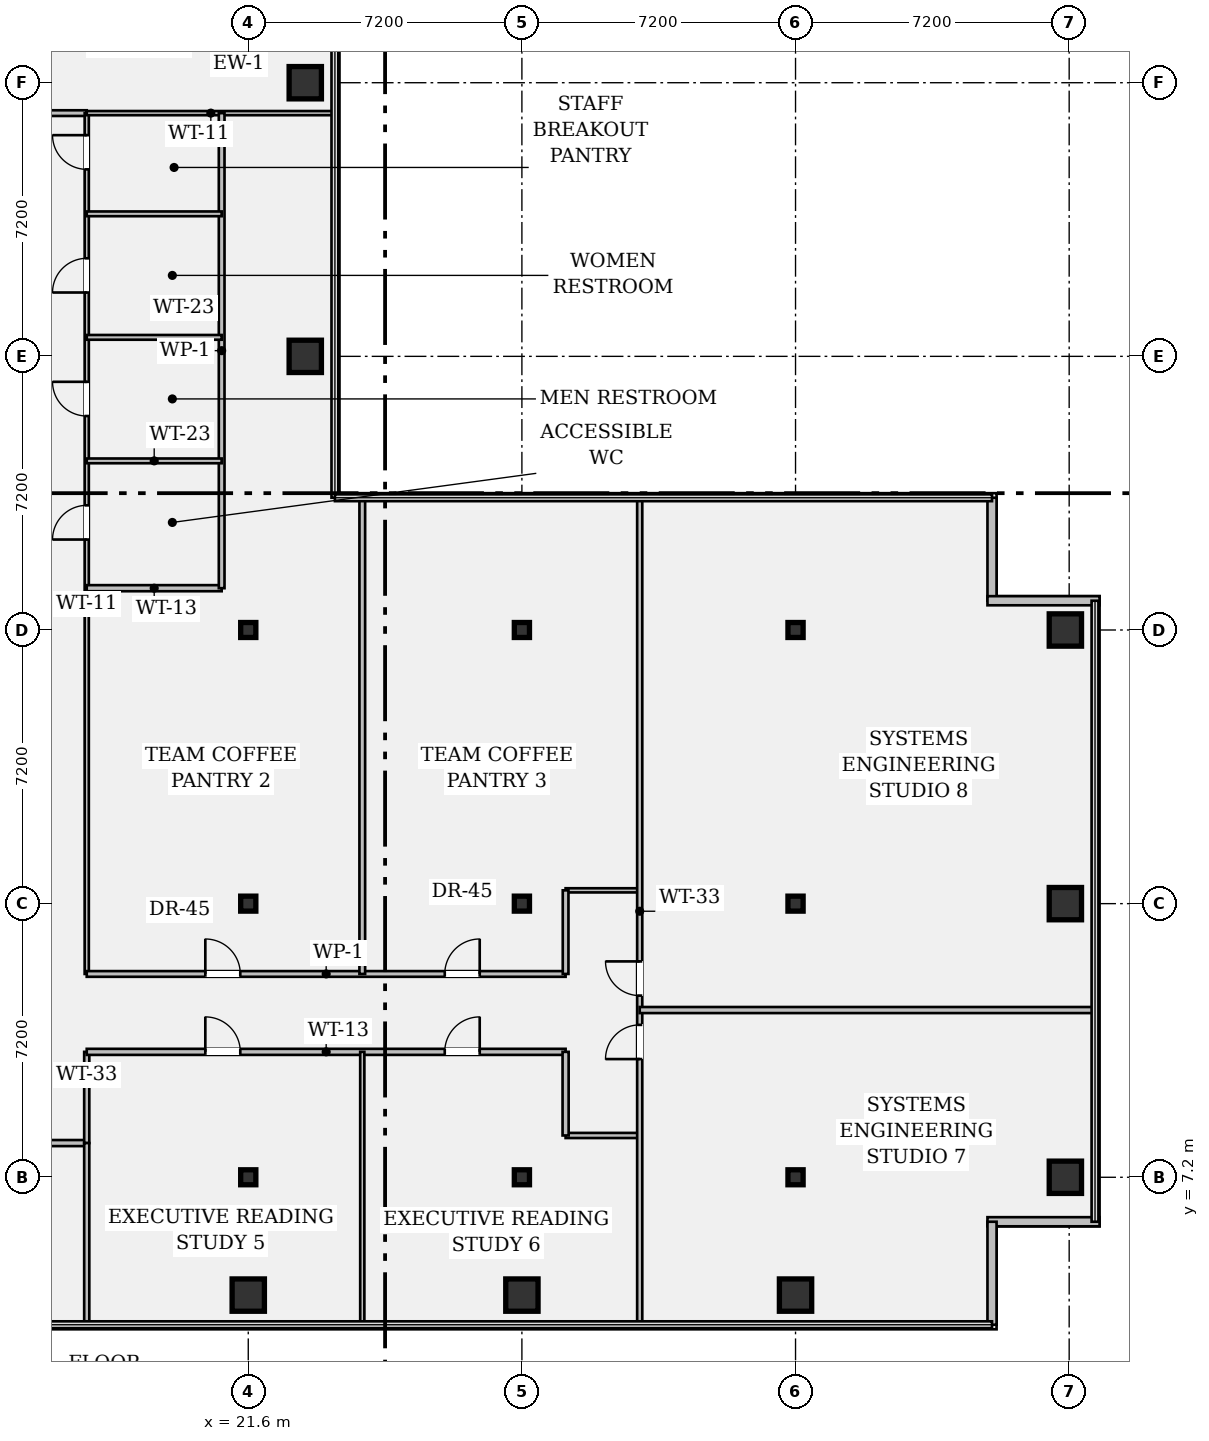
"""IFC4 building model, lengths in metres.
Left out: names, types, materials, properties, quantities, classifications, styles, units other than length and angle.
Written with IfcOpenShell. Run it as: python <this file> out.ifc"""

import sys

from ifc_helpers import new_model, si_unit, direction, frame, frame_2d, origin, origin_2d, place, context, subcontext, project, spatial, rectangle, hollow_rectangle, i_section, extrude, element, fill, save


model = new_model("IFC4")
c1 = context("Model", 3, precision=1e-05, world=origin(), true_north=direction((0.0, 1.0)))
c2 = subcontext(c1, "Body", "Model", "MODEL_VIEW")
j1 = project(units=[si_unit("LENGTHUNIT", "METRE"), si_unit("PLANEANGLEUNIT", "RADIAN")], contexts=[c1])
p1 = place(None, origin())
s1 = spatial("IfcSite", under=j1, at=p1, CompositionType="ELEMENT")
p2 = place(p1, origin())
s2 = spatial("IfcBuilding", under=s1, at=p2, CompositionType="ELEMENT")
p3 = place(p2, frame((0.0, 0.0, 173.25)))
s3 = spatial("IfcBuildingStorey", under=s2, at=p3, CompositionType="ELEMENT", Elevation=173.25)
p4 = place(p3, frame((21.6, 4.1, 0.0), z_axis=(0.0, 0.0, 1.0), x_axis=(1.0, 0.0, 0.0)))
e1 = element("IfcColumn", 1, at=p4, inside=s3, PredefinedType="COLUMN", context=c2, shape_type="SweptSolid", body=[
    extrude(hollow_rectangle(XDim=0.85, YDim=0.85, WallThickness=0.05, at=origin_2d()), origin(), (0.0, 0.0, 1.0), 3.24),
])
for number, where, z_axis, x_axis in (
    (2, (21.6, 7.2, 0.0), (0.0, 0.0, 1.0), (1.0, 0.0, 0.0)),
    (3, (21.6, 14.4, 0.0), (0.0, 0.0, 1.0), (1.0, 0.0, 0.0)),
    (4, (21.6, 21.6, 0.0), (0.0, 0.0, 1.0), (1.0, 0.0, 0.0)),
):
    element("IfcColumn", number, at=place(p3, frame(where, z_axis=z_axis, x_axis=x_axis)), inside=s3, PredefinedType="COLUMN", context=c2, shape_type="SweptSolid", body=[
        extrude(i_section(OverallWidth=0.399, OverallDepth=0.394, WebThickness=0.023, FlangeThickness=0.037, FilletRadius=0.018, at=origin_2d()), origin(), (0.0, 0.0, 1.0), 3.24),
    ])
for number, where, z_axis, x_axis in (
    (5, (23.1, 28.8, 0.0), (0.0, 0.0, 1.0), (1.0, 0.0, 0.0)),
    (6, (23.1, 36.0, 0.0), (0.0, 0.0, 1.0), (1.0, 0.0, 0.0)),
    (7, (28.8, 4.1, 0.0), (0.0, 0.0, 1.0), (1.0, 0.0, 0.0)),
):
    element("IfcColumn", number, at=place(p3, frame(where, z_axis=z_axis, x_axis=x_axis)), inside=s3, PredefinedType="COLUMN", context=c2, shape_type="SweptSolid", body=[
        extrude(hollow_rectangle(XDim=0.85, YDim=0.85, WallThickness=0.05, at=origin_2d()), origin(), (0.0, 0.0, 1.0), 3.24),
    ])
for number, where, z_axis, x_axis in (
    (8, (28.8, 7.2, 0.0), (0.0, 0.0, 1.0), (1.0, 0.0, 0.0)),
    (9, (28.8, 14.4, 0.0), (0.0, 0.0, 1.0), (1.0, 0.0, 0.0)),
    (10, (28.8, 21.6, 0.0), (0.0, 0.0, 1.0), (1.0, 0.0, 0.0)),
):
    element("IfcColumn", number, at=place(p3, frame(where, z_axis=z_axis, x_axis=x_axis)), inside=s3, PredefinedType="COLUMN", context=c2, shape_type="SweptSolid", body=[
        extrude(i_section(OverallWidth=0.399, OverallDepth=0.394, WebThickness=0.023, FlangeThickness=0.037, FilletRadius=0.018, at=origin_2d()), origin(), (0.0, 0.0, 1.0), 3.24),
    ])
p5 = place(p3, frame((36.0, 4.1, 0.0), z_axis=(0.0, 0.0, 1.0), x_axis=(1.0, 0.0, 0.0)))
e11 = element("IfcColumn", 11, at=p5, inside=s3, PredefinedType="COLUMN", context=c2, shape_type="SweptSolid", body=[
    extrude(hollow_rectangle(XDim=0.85, YDim=0.85, WallThickness=0.05, at=origin_2d()), origin(), (0.0, 0.0, 1.0), 3.24),
])
for number, where, z_axis, x_axis in (
    (12, (36.0, 7.2, 0.0), (0.0, 0.0, 1.0), (1.0, 0.0, 0.0)),
    (13, (36.0, 14.4, 0.0), (0.0, 0.0, 1.0), (1.0, 0.0, 0.0)),
    (14, (36.0, 21.6, 0.0), (0.0, 0.0, 1.0), (1.0, 0.0, 0.0)),
):
    element("IfcColumn", number, at=place(p3, frame(where, z_axis=z_axis, x_axis=x_axis)), inside=s3, PredefinedType="COLUMN", context=c2, shape_type="SweptSolid", body=[
        extrude(i_section(OverallWidth=0.399, OverallDepth=0.394, WebThickness=0.023, FlangeThickness=0.037, FilletRadius=0.018, at=origin_2d()), origin(), (0.0, 0.0, 1.0), 3.24),
    ])
for number, where, z_axis, x_axis in (
    (15, (43.1, 7.2, 0.0), (0.0, 0.0, 1.0), (1.0, 0.0, 0.0)),
    (16, (43.1, 14.4, 0.0), (0.0, 0.0, 1.0), (1.0, 0.0, 0.0)),
    (17, (43.1, 21.6, 0.0), (0.0, 0.0, 1.0), (1.0, 0.0, 0.0)),
):
    element("IfcColumn", number, at=place(p3, frame(where, z_axis=z_axis, x_axis=x_axis)), inside=s3, PredefinedType="COLUMN", context=c2, shape_type="SweptSolid", body=[
        extrude(hollow_rectangle(XDim=0.85, YDim=0.85, WallThickness=0.05, at=origin_2d()), origin(), (0.0, 0.0, 1.0), 3.24),
    ])
p6 = place(p3, frame((41.17, 25.08, 0.0), z_axis=(0.0, 0.0, 1.0), x_axis=(0.0, -1.0, 0.0)))
e18 = element("IfcWall", 18, at=p6, inside=s3, PredefinedType="STANDARD", context=c2, shape_type="SweptSolid", body=[
    extrude(rectangle(XDim=2.71, YDim=0.24, at=frame_2d((1.355, 0.0))), origin(), (0.0, 0.0, 1.0), 3.24),
])
for number, where, z_axis, x_axis in (
    (19, (41.05, 22.37, 0.0), (0.0, 0.0, 1.0), (1.0, 0.0, 0.0)),
    (20, (44.0, 6.03, 0.0), (0.0, 0.0, 1.0), (-1.0, 0.0, 0.0)),
):
    element("IfcWall", number, at=place(p3, frame(where, z_axis=z_axis, x_axis=x_axis)), inside=s3, PredefinedType="STANDARD", context=c2, shape_type="SweptSolid", body=[
        extrude(rectangle(XDim=2.95, YDim=0.24, at=frame_2d((1.475, 0.0))), origin(), (0.0, 0.0, 1.0), 3.24),
    ])
p7 = place(p3, frame((41.17, 6.03, 0.0), z_axis=(0.0, 0.0, 1.0), x_axis=(0.0, -1.0, 0.0)))
e21 = element("IfcWall", 21, at=p7, inside=s3, PredefinedType="STANDARD", context=c2, shape_type="SweptSolid", body=[
    extrude(rectangle(XDim=2.71, YDim=0.24, at=frame_2d((1.355, 0.0))), origin(), (0.0, 0.0, 1.0), 3.24),
])
p8 = place(p3, frame((14.4, 8.1, 0.0), z_axis=(0.0, 0.0, 1.0), x_axis=(1.0, 0.0, 0.0)))
e22 = element("IfcWall", 22, at=p8, inside=s3, PredefinedType="PARTITIONING", context=c2, shape_type="SweptSolid", body=[
    extrude(rectangle(XDim=2.95, YDim=0.16, at=frame_2d((1.475, 0.0))), origin(), (0.0, 0.0, 1.0), 2.808),
])
p9 = place(p8, frame((0.95, 0.0, 0.0)))
e23 = element("IfcOpeningElement", 23, at=p9, cuts=e22, PredefinedType="OPENING", context=c2, shape_type="SweptSolid", body=[
    extrude(rectangle(XDim=0.92, YDim=2.15, at=frame_2d((0.46, 1.075))), frame((0.0, 0.092, 0.0), z_axis=(0.0, -1.0, 0.0), x_axis=(1.0, 0.0, 0.0)), (0.0, 0.0, 1.0), 0.184),
])
p10 = place(p3, frame((14.4, 35.2, 0.0), z_axis=(0.0, 0.0, 1.0), x_axis=(1.0, 0.0, 0.0)))
e24 = element("IfcWall", 24, at=p10, inside=s3, PredefinedType="PARTITIONING", context=c2, shape_type="SweptSolid", body=[
    extrude(rectangle(XDim=2.95, YDim=0.15, at=frame_2d((1.475, 0.0))), origin(), (0.0, 0.0, 1.0), 2.808),
])
p11 = place(p10, frame((0.95, 0.0, 0.0)))
e25 = element("IfcOpeningElement", 25, at=p11, cuts=e24, PredefinedType="OPENING", context=c2, shape_type="SweptSolid", body=[
    extrude(rectangle(XDim=1.0, YDim=2.15, at=frame_2d((0.5, 1.075))), frame((0.0, 0.087, 0.0), z_axis=(0.0, -1.0, 0.0), x_axis=(1.0, 0.0, 0.0)), (0.0, 0.0, 1.0), 0.174),
])
p12 = place(p3, frame((17.35, 8.1, 0.0), z_axis=(0.0, 0.0, 1.0), x_axis=(0.0, 1.0, 0.0)))
e26 = element("IfcWall", 26, at=p12, inside=s3, PredefinedType="PARTITIONING", context=c2, shape_type="SweptSolid", body=[
    extrude(rectangle(XDim=2.4, YDim=0.135, at=frame_2d((1.2, 0.0))), origin(), (0.0, 0.0, 1.0), 3.24),
])
p13 = place(p3, frame((17.35, 12.55, 0.0), z_axis=(0.0, 0.0, 1.0), x_axis=(0.0, 1.0, 0.0)))
e27 = element("IfcWall", 27, at=p13, inside=s3, PredefinedType="PARTITIONING", context=c2, shape_type="SweptSolid", body=[
    extrude(rectangle(XDim=22.65, YDim=0.11, at=frame_2d((11.325, 0.0))), origin(), (0.0, 0.0, 1.0), 2.603),
])
p14 = place(p13, frame((11.43, 0.0, 0.0)))
e28 = element("IfcOpeningElement", 28, at=p14, cuts=e27, PredefinedType="OPENING", context=c2, shape_type="SweptSolid", body=[
    extrude(rectangle(XDim=0.9, YDim=2.15, at=frame_2d((0.45, 1.075))), frame((0.0, 0.067, 0.0), z_axis=(0.0, -1.0, 0.0), x_axis=(1.0, 0.0, 0.0)), (0.0, 0.0, 1.0), 0.134),
])
p15 = place(p13, frame((14.68, 0.0, 0.0)))
e29 = element("IfcOpeningElement", 29, at=p15, cuts=e27, PredefinedType="OPENING", context=c2, shape_type="SweptSolid", body=[
    extrude(rectangle(XDim=0.9, YDim=2.15, at=frame_2d((0.45, 1.075))), frame((0.0, 0.067, 0.0), z_axis=(0.0, -1.0, 0.0), x_axis=(1.0, 0.0, 0.0)), (0.0, 0.0, 1.0), 0.134),
])
p16 = place(p13, frame((17.93, 0.0, 0.0)))
e30 = element("IfcOpeningElement", 30, at=p16, cuts=e27, PredefinedType="OPENING", context=c2, shape_type="SweptSolid", body=[
    extrude(rectangle(XDim=0.9, YDim=2.15, at=frame_2d((0.45, 1.075))), frame((0.0, 0.067, 0.0), z_axis=(0.0, -1.0, 0.0), x_axis=(1.0, 0.0, 0.0)), (0.0, 0.0, 1.0), 0.134),
])
p17 = place(p13, frame((21.17, 0.0, 0.0)))
e31 = element("IfcOpeningElement", 31, at=p17, cuts=e27, PredefinedType="OPENING", context=c2, shape_type="SweptSolid", body=[
    extrude(rectangle(XDim=0.9, YDim=2.15, at=frame_2d((0.45, 1.075))), frame((0.0, 0.067, 0.0), z_axis=(0.0, -1.0, 0.0), x_axis=(1.0, 0.0, 0.0)), (0.0, 0.0, 1.0), 0.134),
])
p18 = place(p3, frame((17.35, 10.5, 0.0), z_axis=(0.0, 0.0, 1.0), x_axis=(1.0, 0.0, 0.0)))
e32 = element("IfcWall", 32, at=p18, inside=s3, PredefinedType="PARTITIONING", context=c2, shape_type="SweptSolid", body=[
    extrude(rectangle(XDim=12.6, YDim=0.16, at=frame_2d((6.3, 0.0))), origin(), (0.0, 0.0, 1.0), 2.603),
])
p19 = place(p18, frame((3.12, 0.0, 0.0)))
e33 = element("IfcOpeningElement", 33, at=p19, cuts=e32, PredefinedType="OPENING", context=c2, shape_type="SweptSolid", body=[
    extrude(rectangle(XDim=0.92, YDim=2.15, at=frame_2d((0.46, 1.075))), frame((0.0, 0.092, 0.0), z_axis=(0.0, -1.0, 0.0), x_axis=(1.0, 0.0, 0.0)), (0.0, 0.0, 1.0), 0.184),
])
p20 = place(p18, frame((9.42, 0.0, 0.0)))
e34 = element("IfcOpeningElement", 34, at=p20, cuts=e32, PredefinedType="OPENING", context=c2, shape_type="SweptSolid", body=[
    extrude(rectangle(XDim=0.92, YDim=2.15, at=frame_2d((0.46, 1.075))), frame((0.0, 0.092, 0.0), z_axis=(0.0, -1.0, 0.0), x_axis=(1.0, 0.0, 0.0)), (0.0, 0.0, 1.0), 0.184),
])
p21 = place(p3, frame((17.35, 12.55, 0.0), z_axis=(0.0, 0.0, 1.0), x_axis=(1.0, 0.0, 0.0)))
e35 = element("IfcWall", 35, at=p21, inside=s3, PredefinedType="PARTITIONING", context=c2, shape_type="SweptSolid", body=[
    extrude(rectangle(XDim=12.6, YDim=0.15, at=frame_2d((6.3, 0.0))), origin(), (0.0, 0.0, 1.0), 2.603),
])
p22 = place(p21, frame((3.12, 0.0, 0.0)))
e36 = element("IfcOpeningElement", 36, at=p22, cuts=e35, PredefinedType="OPENING", context=c2, shape_type="SweptSolid", body=[
    extrude(rectangle(XDim=0.92, YDim=2.15, at=frame_2d((0.46, 1.075))), frame((0.0, 0.087, 0.0), z_axis=(0.0, -1.0, 0.0), x_axis=(1.0, 0.0, 0.0)), (0.0, 0.0, 1.0), 0.174),
])
p23 = place(p21, frame((9.42, 0.0, 0.0)))
e37 = element("IfcOpeningElement", 37, at=p23, cuts=e35, PredefinedType="OPENING", context=c2, shape_type="SweptSolid", body=[
    extrude(rectangle(XDim=0.92, YDim=2.15, at=frame_2d((0.46, 1.075))), frame((0.0, 0.087, 0.0), z_axis=(0.0, -1.0, 0.0), x_axis=(1.0, 0.0, 0.0)), (0.0, 0.0, 1.0), 0.174),
])
p24 = place(p3, frame((29.95, 8.3, 0.0), z_axis=(0.0, 0.0, 1.0), x_axis=(1.0, 0.0, 0.0)))
e38 = element("IfcWall", 38, at=p24, inside=s3, PredefinedType="PARTITIONING", context=c2, shape_type="SweptSolid", body=[
    extrude(rectangle(XDim=1.95, YDim=0.135, at=frame_2d((0.975, 0.0))), origin(), (0.0, 0.0, 1.0), 2.808),
])
p25 = place(p3, frame((29.95, 14.75, 0.0), z_axis=(0.0, 0.0, 1.0), x_axis=(1.0, 0.0, 0.0)))
e39 = element("IfcWall", 39, at=p25, inside=s3, PredefinedType="PARTITIONING", context=c2, shape_type="SweptSolid", body=[
    extrude(rectangle(XDim=1.95, YDim=0.11, at=frame_2d((0.975, 0.0))), origin(), (0.0, 0.0, 1.0), 2.808),
])
p26 = place(p3, frame((29.95, 8.3, 0.0), z_axis=(0.0, 0.0, 1.0), x_axis=(0.0, 1.0, 0.0)))
e40 = element("IfcWall", 40, at=p26, inside=s3, PredefinedType="PARTITIONING", context=c2, shape_type="SweptSolid", body=[
    extrude(rectangle(XDim=2.2, YDim=0.16, at=frame_2d((1.1, 0.0))), origin(), (0.0, 0.0, 1.0), 3.24),
])
p27 = place(p3, frame((29.95, 12.55, 0.0), z_axis=(0.0, 0.0, 1.0), x_axis=(0.0, 1.0, 0.0)))
e41 = element("IfcWall", 41, at=p27, inside=s3, PredefinedType="PARTITIONING", context=c2, shape_type="SweptSolid", body=[
    extrude(rectangle(XDim=2.2, YDim=0.15, at=frame_2d((1.1, 0.0))), origin(), (0.0, 0.0, 1.0), 2.603),
])
p28 = place(p3, frame((31.9, 3.32, 0.0), z_axis=(0.0, 0.0, 1.0), x_axis=(0.0, 1.0, 0.0)))
e42 = element("IfcWall", 42, at=p28, inside=s3, PredefinedType="PARTITIONING", context=c2, shape_type="SweptSolid", body=[
    extrude(rectangle(XDim=21.76, YDim=0.135, at=frame_2d((10.88, 0.0))), origin(), (0.0, 0.0, 1.0), 2.603),
])
p29 = place(p28, frame((6.99, 0.0, 0.0)))
e43 = element("IfcOpeningElement", 43, at=p29, cuts=e42, PredefinedType="OPENING", context=c2, shape_type="SweptSolid", body=[
    extrude(rectangle(XDim=0.9, YDim=2.15, at=frame_2d((0.45, 1.075))), frame((0.0, 0.08, 0.0), z_axis=(0.0, -1.0, 0.0), x_axis=(1.0, 0.0, 0.0)), (0.0, 0.0, 1.0), 0.159),
])
p30 = place(p28, frame((8.66, 0.0, 0.0)))
e44 = element("IfcOpeningElement", 44, at=p30, cuts=e42, PredefinedType="OPENING", context=c2, shape_type="SweptSolid", body=[
    extrude(rectangle(XDim=0.9, YDim=2.15, at=frame_2d((0.45, 1.075))), frame((0.0, 0.08, 0.0), z_axis=(0.0, -1.0, 0.0), x_axis=(1.0, 0.0, 0.0)), (0.0, 0.0, 1.0), 0.159),
])
p31 = place(p3, frame((17.35, 35.2, 0.0), z_axis=(0.0, 0.0, 1.0), x_axis=(1.0, 0.0, 0.0)))
e45 = element("IfcWall", 45, at=p31, inside=s3, PredefinedType="PARTITIONING", context=c2, shape_type="SweptSolid", body=[
    extrude(rectangle(XDim=6.53, YDim=0.11, at=frame_2d((3.265, 0.0))), origin(), (0.0, 0.0, 1.0), 2.758),
])
p32 = place(p3, frame((17.35, 22.7, 0.0), z_axis=(0.0, 0.0, 1.0), x_axis=(1.0, 0.0, 0.0)))
e46 = element("IfcWall", 46, at=p32, inside=s3, PredefinedType="PARTITIONING", context=c2, shape_type="SweptSolid", body=[
    extrude(rectangle(XDim=3.55, YDim=0.16, at=frame_2d((1.775, 0.0))), origin(), (0.0, 0.0, 1.0), 2.808),
])
p33 = place(p3, frame((20.9, 22.7, 0.0), z_axis=(0.0, 0.0, 1.0), x_axis=(0.0, 1.0, 0.0)))
e47 = element("IfcWall", 47, at=p33, inside=s3, PredefinedType="PARTITIONING", context=c2, shape_type="SweptSolid", body=[
    extrude(rectangle(XDim=12.5, YDim=0.15, at=frame_2d((6.25, 0.0))), origin(), (0.0, 0.0, 1.0), 2.603),
])
for number, where, z_axis, x_axis in (
    (48, (17.35, 26.05, 0.0), (0.0, 0.0, 1.0), (1.0, 0.0, 0.0)),
    (49, (17.35, 29.3, 0.0), (0.0, 0.0, 1.0), (1.0, 0.0, 0.0)),
    (50, (17.35, 32.55, 0.0), (0.0, 0.0, 1.0), (1.0, 0.0, 0.0)),
):
    element("IfcWall", number, at=place(p3, frame(where, z_axis=z_axis, x_axis=x_axis)), inside=s3, PredefinedType="PARTITIONING", context=c2, shape_type="SweptSolid", body=[
        extrude(rectangle(XDim=3.55, YDim=0.125, at=frame_2d((1.775, 0.0))), origin(), (0.0, 0.0, 1.0), 2.808),
    ])
p34 = place(p3, frame((24.6, 12.55, 0.0), z_axis=(0.0, 0.0, 1.0), x_axis=(0.0, 1.0, 0.0)))
e51 = element("IfcWall", 51, at=p34, inside=s3, PredefinedType="PARTITIONING", context=c2, shape_type="SweptSolid", body=[
    extrude(rectangle(XDim=12.5, YDim=0.15, at=frame_2d((6.25, 0.0))), origin(), (0.0, 0.0, 1.0), 2.603),
])
p35 = place(p3, frame((17.35, 3.32, 0.0), z_axis=(0.0, 0.0, 1.0), x_axis=(0.0, 1.0, 0.0)))
e52 = element("IfcWall", 52, at=p35, inside=s3, PredefinedType="PARTITIONING", context=c2, shape_type="SweptSolid", body=[
    extrude(rectangle(XDim=4.78, YDim=0.135, at=frame_2d((2.39, 0.0))), origin(), (0.0, 0.0, 1.0), 2.603),
])
p36 = place(p3, frame((24.6, 3.32, 0.0), z_axis=(0.0, 0.0, 1.0), x_axis=(0.0, 1.0, 0.0)))
e53 = element("IfcWall", 53, at=p36, inside=s3, PredefinedType="PARTITIONING", context=c2, shape_type="SweptSolid", body=[
    extrude(rectangle(XDim=7.18, YDim=0.11, at=frame_2d((3.59, 0.0))), origin(), (0.0, 0.0, 1.0), 2.603),
])
p37 = place(p3, frame((31.9, 11.6, 0.0), z_axis=(0.0, 0.0, 1.0), x_axis=(1.0, 0.0, 0.0)))
e54 = element("IfcWall", 54, at=p37, inside=s3, PredefinedType="PARTITIONING", context=c2, shape_type="SweptSolid", body=[
    extrude(rectangle(XDim=11.98, YDim=0.16, at=frame_2d((5.99, 0.0))), origin(), (0.0, 0.0, 1.0), 2.603),
])
p38 = place(p14, origin())
e55 = element("IfcDoor", 55, at=p38, inside=s3, OperationType="SINGLE_SWING_LEFT", PredefinedType="DOOR", context=c2, shape_type="SweptSolid", body=[
    extrude(rectangle(XDim=0.9, YDim=2.15, at=frame_2d((0.45, 1.075))), frame((0.0, 0.025, 0.0), z_axis=(0.0, -1.0, 0.0), x_axis=(1.0, 0.0, 0.0)), (0.0, 0.0, 1.0), 0.05),
])
fill(e28, e55)
p39 = place(p15, origin())
e56 = element("IfcDoor", 56, at=p39, inside=s3, OperationType="SINGLE_SWING_RIGHT", PredefinedType="DOOR", context=c2, shape_type="SweptSolid", body=[
    extrude(rectangle(XDim=0.9, YDim=2.15, at=frame_2d((0.45, 1.075))), frame((0.0, 0.025, 0.0), z_axis=(0.0, -1.0, 0.0), x_axis=(1.0, 0.0, 0.0)), (0.0, 0.0, 1.0), 0.05),
])
fill(e29, e56)
p40 = place(p16, origin())
e57 = element("IfcDoor", 57, at=p40, inside=s3, OperationType="SINGLE_SWING_LEFT", PredefinedType="DOOR", context=c2, shape_type="SweptSolid", body=[
    extrude(rectangle(XDim=0.9, YDim=2.15, at=frame_2d((0.45, 1.075))), frame((0.0, 0.025, 0.0), z_axis=(0.0, -1.0, 0.0), x_axis=(1.0, 0.0, 0.0)), (0.0, 0.0, 1.0), 0.05),
])
fill(e30, e57)
p41 = place(p17, origin())
e58 = element("IfcDoor", 58, at=p41, inside=s3, OperationType="SINGLE_SWING_RIGHT", PredefinedType="DOOR", context=c2, shape_type="SweptSolid", body=[
    extrude(rectangle(XDim=0.9, YDim=2.15, at=frame_2d((0.45, 1.075))), frame((0.0, 0.025, 0.0), z_axis=(0.0, -1.0, 0.0), x_axis=(1.0, 0.0, 0.0)), (0.0, 0.0, 1.0), 0.05),
])
fill(e31, e58)
p42 = place(p22, origin())
e59 = element("IfcDoor", 59, at=p42, inside=s3, OperationType="SINGLE_SWING_LEFT", PredefinedType="DOOR", context=c2, shape_type="SweptSolid", body=[
    extrude(rectangle(XDim=0.92, YDim=2.15, at=frame_2d((0.46, 1.075))), frame((0.0, 0.025, 0.0), z_axis=(0.0, -1.0, 0.0), x_axis=(1.0, 0.0, 0.0)), (0.0, 0.0, 1.0), 0.05),
])
fill(e36, e59)
p43 = place(p23, origin())
e60 = element("IfcDoor", 60, at=p43, inside=s3, OperationType="SINGLE_SWING_RIGHT", PredefinedType="DOOR", context=c2, shape_type="SweptSolid", body=[
    extrude(rectangle(XDim=0.92, YDim=2.15, at=frame_2d((0.46, 1.075))), frame((0.0, 0.025, 0.0), z_axis=(0.0, -1.0, 0.0), x_axis=(1.0, 0.0, 0.0)), (0.0, 0.0, 1.0), 0.05),
])
fill(e37, e60)
p44 = place(p19, origin())
e61 = element("IfcDoor", 61, at=p44, inside=s3, OperationType="SINGLE_SWING_LEFT", PredefinedType="DOOR", context=c2, shape_type="SweptSolid", body=[
    extrude(rectangle(XDim=0.92, YDim=2.15, at=frame_2d((0.46, 1.075))), frame((0.0, 0.025, 0.0), z_axis=(0.0, -1.0, 0.0), x_axis=(1.0, 0.0, 0.0)), (0.0, 0.0, 1.0), 0.05),
])
fill(e33, e61)
p45 = place(p20, origin())
e62 = element("IfcDoor", 62, at=p45, inside=s3, OperationType="SINGLE_SWING_RIGHT", PredefinedType="DOOR", context=c2, shape_type="SweptSolid", body=[
    extrude(rectangle(XDim=0.92, YDim=2.15, at=frame_2d((0.46, 1.075))), frame((0.0, 0.025, 0.0), z_axis=(0.0, -1.0, 0.0), x_axis=(1.0, 0.0, 0.0)), (0.0, 0.0, 1.0), 0.05),
])
fill(e34, e62)
p46 = place(p29, origin())
e63 = element("IfcDoor", 63, at=p46, inside=s3, OperationType="SINGLE_SWING_LEFT", PredefinedType="DOOR", context=c2, shape_type="SweptSolid", body=[
    extrude(rectangle(XDim=0.9, YDim=2.15, at=frame_2d((0.45, 1.075))), frame((0.0, 0.025, 0.0), z_axis=(0.0, -1.0, 0.0), x_axis=(1.0, 0.0, 0.0)), (0.0, 0.0, 1.0), 0.05),
])
fill(e43, e63)
p47 = place(p30, origin())
e64 = element("IfcDoor", 64, at=p47, inside=s3, OperationType="SINGLE_SWING_RIGHT", PredefinedType="DOOR", context=c2, shape_type="SweptSolid", body=[
    extrude(rectangle(XDim=0.9, YDim=2.15, at=frame_2d((0.45, 1.075))), frame((0.0, 0.025, 0.0), z_axis=(0.0, -1.0, 0.0), x_axis=(1.0, 0.0, 0.0)), (0.0, 0.0, 1.0), 0.05),
])
fill(e44, e64)
save(model, sys.argv[1])
